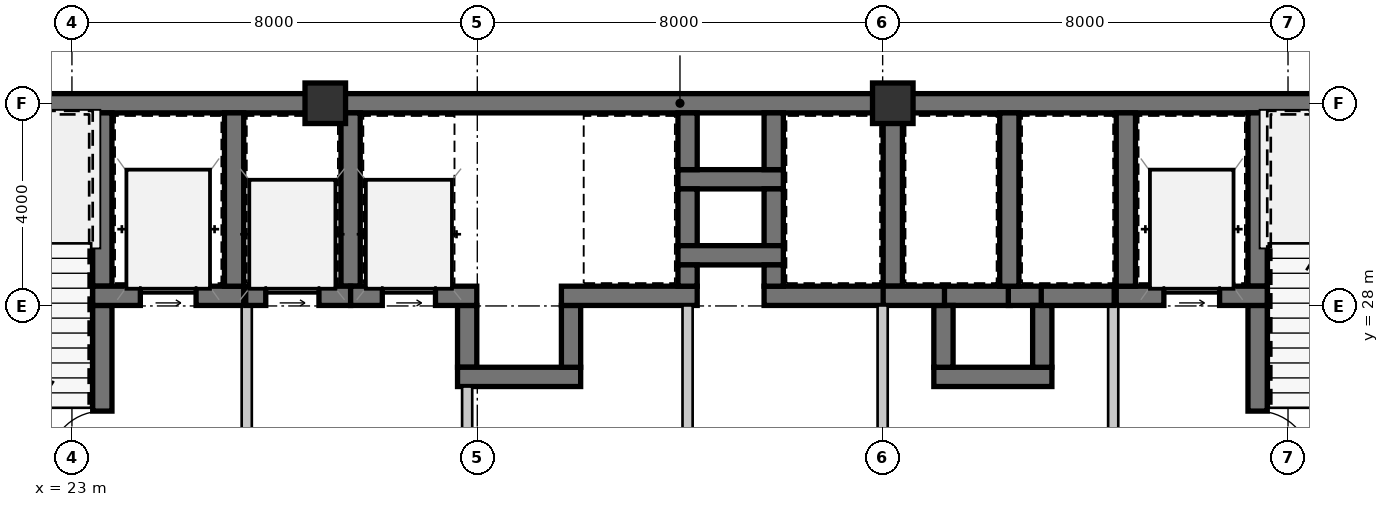
"""IFC4 building model, lengths in metres.
Left out: names, types, materials, properties, quantities, classifications, styles, units other than length and angle.
Written with IfcOpenShell. Run it as: python <this file> out.ifc"""

import sys

from ifc_helpers import new_model, si_unit, direction, frame, frame_2d, origin, origin_2d, place, context, subcontext, project, spatial, rectangle, extrude, source, transform, mapped, element, fill, save


model = new_model("IFC4")
c1 = context("Model", 3, precision=1e-05, world=origin(), true_north=direction((0.0, 1.0)))
c2 = subcontext(c1, "Body", "Model", "MODEL_VIEW")
j1 = project(units=[si_unit("LENGTHUNIT", "METRE"), si_unit("PLANEANGLEUNIT", "RADIAN")], contexts=[c1])
p1 = place(None, origin())
s1 = spatial("IfcSite", under=j1, at=p1, CompositionType="ELEMENT")
p2 = place(p1, origin())
s2 = spatial("IfcBuilding", under=s1, at=p2, CompositionType="ELEMENT")
p3 = place(p2, frame((0.0, 0.0, 19.95)))
s3 = spatial("IfcBuildingStorey", under=s2, at=p3, CompositionType="ELEMENT", Elevation=19.95)
m1 = source(origin(), c2, "Body", "SweptSolid", [
    extrude(rectangle(XDim=0.8, YDim=0.8, at=origin_2d()), origin(), (0.0, 0.0, 1.0), 3.15),
])
for number, where, z_axis, x_axis in (
    (1, (28.0, 32.0, 0.0), (0.0, 0.0, 1.0), (1.0, 0.0, 0.0)),
    (2, (39.2, 32.0, 0.0), (0.0, 0.0, 1.0), (1.0, 0.0, 0.0)),
):
    element("IfcColumn", number, at=place(p3, frame(where, z_axis=z_axis, x_axis=x_axis)), inside=s3, PredefinedType="COLUMN", context=c2, shape_type="MappedRepresentation", body=[
        mapped(m1, transform((0.0, 0.0, 0.0), scale=1.0)),
    ])
m2 = source(origin(), c2, "Body", "SweptSolid", [
    extrude(rectangle(XDim=9.19, YDim=0.38, at=frame_2d((4.595, 0.0))), origin(), (0.0, 0.0, 1.0), 2.93),
])
p4 = place(p3, frame((18.81, 32.0, 0.0), z_axis=(0.0, 0.0, 1.0), x_axis=(1.0, 0.0, 0.0)))
e3 = element("IfcWall", 3, at=p4, inside=s3, PredefinedType="SHEAR", context=c2, shape_type="MappedRepresentation", body=[
    mapped(m2, transform((0.0, 0.0, 0.0), scale=1.0)),
])
m3 = source(origin(), c2, "Body", "SweptSolid", [
    extrude(rectangle(XDim=11.2, YDim=0.38, at=frame_2d((5.6, 0.0))), origin(), (0.0, 0.0, 1.0), 2.93),
])
p5 = place(p3, frame((28.0, 32.0, 0.0), z_axis=(0.0, 0.0, 1.0), x_axis=(1.0, 0.0, 0.0)))
e4 = element("IfcWall", 4, at=p5, inside=s3, PredefinedType="SHEAR", context=c2, shape_type="MappedRepresentation", body=[
    mapped(m3, transform((0.0, 0.0, 0.0), scale=1.0)),
])
m4 = source(origin(), c2, "Body", "SweptSolid", [
    extrude(rectangle(XDim=11.99, YDim=0.38, at=frame_2d((5.995, 0.0))), origin(), (0.0, 0.0, 1.0), 2.93),
])
p6 = place(p3, frame((39.2, 32.0, 0.0), z_axis=(0.0, 0.0, 1.0), x_axis=(1.0, 0.0, 0.0)))
e5 = element("IfcWall", 5, at=p6, inside=s3, PredefinedType="SHEAR", context=c2, shape_type="MappedRepresentation", body=[
    mapped(m4, transform((0.0, 0.0, 0.0), scale=1.0)),
])
m5 = source(origin(), c2, "Body", "SweptSolid", [
    extrude(rectangle(XDim=3.42, YDim=0.38, at=frame_2d((1.71, 0.0))), origin(), (0.0, 0.0, 1.0), 2.93),
])
p7 = place(p3, frame((23.6, 28.39, 0.0), z_axis=(0.0, 0.0, 1.0), x_axis=(0.0, 1.0, 0.0)))
e6 = element("IfcWall", 6, at=p7, inside=s3, PredefinedType="SHEAR", context=c2, shape_type="MappedRepresentation", body=[
    mapped(m5, transform((0.0, 0.0, 0.0), scale=1.0)),
])
m6 = source(origin(), c2, "Body", "SweptSolid", [
    extrude(rectangle(XDim=3.82, YDim=0.38, at=frame_2d((1.91, 0.0))), origin(), (0.0, 0.0, 1.0), 2.93),
])
p8 = place(p3, frame((23.6, 24.19, 0.0), z_axis=(0.0, 0.0, 1.0), x_axis=(0.0, 1.0, 0.0)))
e7 = element("IfcWall", 7, at=p8, inside=s3, PredefinedType="SHEAR", context=c2, shape_type="MappedRepresentation", body=[
    mapped(m6, transform((0.0, 0.0, 0.0), scale=1.0)),
])
m7 = source(origin(), c2, "Body", "SweptSolid", [
    extrude(rectangle(XDim=1.05, YDim=2.1, at=frame_2d((0.525, 1.05))), frame((0.0, 0.2, 0.0), z_axis=(0.0, -1.0, 0.0), x_axis=(1.0, 0.0, 0.0)), (0.0, 0.0, 1.0), 0.4),
])
p9 = place(p8, frame((0.685, 0.0, 0.0)))
e8 = element("IfcOpeningElement", 8, at=p9, cuts=e7, PredefinedType="OPENING", context=c2, shape_type="MappedRepresentation", body=[
    mapped(m7, transform((0.0, 0.0, 0.0), scale=1.0)),
])
m8 = source(origin(), c2, "Body", "SweptSolid", [
    extrude(rectangle(XDim=2.98, YDim=0.38, at=frame_2d((1.49, 0.0))), origin(), (0.0, 0.0, 1.0), 2.93),
])
p10 = place(p3, frame((23.41, 28.2, 0.0), z_axis=(0.0, 0.0, 1.0), x_axis=(1.0, 0.0, 0.0)))
e9 = element("IfcWall", 9, at=p10, inside=s3, PredefinedType="SHEAR", context=c2, shape_type="MappedRepresentation", body=[
    mapped(m8, transform((0.0, 0.0, 0.0), scale=1.0)),
])
m9 = source(origin(), c2, "Body", "SweptSolid", [
    extrude(rectangle(XDim=1.1, YDim=2.15, at=frame_2d((0.55, 1.075))), frame((0.0, 0.2, 0.0), z_axis=(0.0, -1.0, 0.0), x_axis=(1.0, 0.0, 0.0)), (0.0, 0.0, 1.0), 0.4),
])
p11 = place(p10, frame((0.94, 0.0, 0.0)))
e10 = element("IfcOpeningElement", 10, at=p11, cuts=e9, PredefinedType="OPENING", context=c2, shape_type="MappedRepresentation", body=[
    mapped(m9, transform((0.0, 0.0, 0.0), scale=1.0)),
])
p12 = place(p3, frame((26.2, 28.39, 0.0), z_axis=(0.0, 0.0, 1.0), x_axis=(0.0, 1.0, 0.0)))
e11 = element("IfcWall", 11, at=p12, inside=s3, PredefinedType="SHEAR", context=c2, shape_type="MappedRepresentation", body=[
    mapped(m5, transform((0.0, 0.0, 0.0), scale=1.0)),
])
m10 = source(origin(), c2, "Body", "SweptSolid", [
    extrude(rectangle(XDim=3.91, YDim=0.2, at=frame_2d((1.955, 0.0))), origin(), (0.0, 0.0, 1.0), 2.93),
])
p13 = place(p3, frame((26.45, 24.1, 0.0), z_axis=(0.0, 0.0, 1.0), x_axis=(0.0, 1.0, 0.0)))
e12 = element("IfcWall", 12, at=p13, inside=s3, PredefinedType="SOLIDWALL", context=c2, shape_type="MappedRepresentation", body=[
    mapped(m10, transform((0.0, 0.0, 0.0), scale=1.0)),
])
p14 = place(p3, frame((46.4, 31.81, 0.0), z_axis=(0.0, 0.0, 1.0), x_axis=(0.0, -1.0, 0.0)))
e13 = element("IfcWall", 13, at=p14, inside=s3, PredefinedType="SHEAR", context=c2, shape_type="MappedRepresentation", body=[
    mapped(m5, transform((0.0, 0.0, 0.0), scale=1.0)),
])
p15 = place(p3, frame((46.4, 28.01, 0.0), z_axis=(0.0, 0.0, 1.0), x_axis=(0.0, -1.0, 0.0)))
e14 = element("IfcWall", 14, at=p15, inside=s3, PredefinedType="SHEAR", context=c2, shape_type="MappedRepresentation", body=[
    mapped(m6, transform((0.0, 0.0, 0.0), scale=1.0)),
])
p16 = place(p15, frame((2.085, 0.0, 0.0)))
e15 = element("IfcOpeningElement", 15, at=p16, cuts=e14, PredefinedType="OPENING", context=c2, shape_type="MappedRepresentation", body=[
    mapped(m7, transform((0.0, 0.0, 0.0), scale=1.0)),
])
p17 = place(p3, frame((43.61, 28.2, 0.0), z_axis=(0.0, 0.0, 1.0), x_axis=(1.0, 0.0, 0.0)))
e16 = element("IfcWall", 16, at=p17, inside=s3, PredefinedType="SHEAR", context=c2, shape_type="MappedRepresentation", body=[
    mapped(m8, transform((0.0, 0.0, 0.0), scale=1.0)),
])
p18 = place(p17, frame((0.94, 0.0, 0.0)))
e17 = element("IfcOpeningElement", 17, at=p18, cuts=e16, PredefinedType="OPENING", context=c2, shape_type="MappedRepresentation", body=[
    mapped(m9, transform((0.0, 0.0, 0.0), scale=1.0)),
])
p19 = place(p3, frame((43.8, 31.81, 0.0), z_axis=(0.0, 0.0, 1.0), x_axis=(0.0, -1.0, 0.0)))
e18 = element("IfcWall", 18, at=p19, inside=s3, PredefinedType="SHEAR", context=c2, shape_type="MappedRepresentation", body=[
    mapped(m5, transform((0.0, 0.0, 0.0), scale=1.0)),
])
p20 = place(p3, frame((43.55, 28.01, 0.0), z_axis=(0.0, 0.0, 1.0), x_axis=(0.0, -1.0, 0.0)))
e19 = element("IfcWall", 19, at=p20, inside=s3, PredefinedType="SOLIDWALL", context=c2, shape_type="MappedRepresentation", body=[
    mapped(m10, transform((0.0, 0.0, 0.0), scale=1.0)),
])
m11 = source(origin(), c2, "Body", "SweptSolid", [
    extrude(rectangle(XDim=2.08, YDim=0.38, at=frame_2d((1.04, 0.0))), origin(), (0.0, 0.0, 1.0), 2.93),
])
p21 = place(p3, frame((34.96, 30.5, 0.0), z_axis=(0.0, 0.0, 1.0), x_axis=(1.0, 0.0, 0.0)))
e20 = element("IfcWall", 20, at=p21, inside=s3, PredefinedType="SHEAR", context=c2, shape_type="MappedRepresentation", body=[
    mapped(m11, transform((0.0, 0.0, 0.0), scale=1.0)),
])
m12 = source(origin(), c2, "Body", "SweptSolid", [
    extrude(rectangle(XDim=1.12, YDim=0.38, at=frame_2d((0.56, 0.0))), origin(), (0.0, 0.0, 1.0), 2.93),
])
for number, where, z_axis, x_axis in (
    (21, (35.15, 31.81, 0.0), (0.0, 0.0, 1.0), (0.0, -1.0, 0.0)),
    (22, (36.85, 30.69, 0.0), (0.0, 0.0, 1.0), (0.0, 1.0, 0.0)),
    (23, (35.15, 30.31, 0.0), (0.0, 0.0, 1.0), (0.0, -1.0, 0.0)),
    (24, (36.85, 29.19, 0.0), (0.0, 0.0, 1.0), (0.0, 1.0, 0.0)),
):
    element("IfcWall", number, at=place(p3, frame(where, z_axis=z_axis, x_axis=x_axis)), inside=s3, PredefinedType="SHEAR", context=c2, shape_type="MappedRepresentation", body=[
        mapped(m12, transform((0.0, 0.0, 0.0), scale=1.0)),
    ])
p22 = place(p3, frame((34.96, 29.0, 0.0), z_axis=(0.0, 0.0, 1.0), x_axis=(1.0, 0.0, 0.0)))
e25 = element("IfcWall", 25, at=p22, inside=s3, PredefinedType="SHEAR", context=c2, shape_type="MappedRepresentation", body=[
    mapped(m11, transform((0.0, 0.0, 0.0), scale=1.0)),
])
m13 = source(origin(), c2, "Body", "SweptSolid", [
    extrude(rectangle(XDim=1.22, YDim=0.38, at=frame_2d((0.61, 0.0))), origin(), (0.0, 0.0, 1.0), 2.93),
])
p23 = place(p3, frame((30.8, 28.01, 0.0), z_axis=(0.0, 0.0, 1.0), x_axis=(0.0, -1.0, 0.0)))
e26 = element("IfcWall", 26, at=p23, inside=s3, PredefinedType="SHEAR", context=c2, shape_type="MappedRepresentation", body=[
    mapped(m13, transform((0.0, 0.0, 0.0), scale=1.0)),
])
m14 = source(origin(), c2, "Body", "SweptSolid", [
    extrude(rectangle(XDim=2.43, YDim=0.38, at=frame_2d((1.215, 0.0))), origin(), (0.0, 0.0, 1.0), 2.93),
])
p24 = place(p3, frame((30.61, 26.6, 0.0), z_axis=(0.0, 0.0, 1.0), x_axis=(1.0, 0.0, 0.0)))
e27 = element("IfcWall", 27, at=p24, inside=s3, PredefinedType="SHEAR", context=c2, shape_type="MappedRepresentation", body=[
    mapped(m14, transform((0.0, 0.0, 0.0), scale=1.0)),
])
p25 = place(p3, frame((32.85, 26.79, 0.0), z_axis=(0.0, 0.0, 1.0), x_axis=(0.0, 1.0, 0.0)))
e28 = element("IfcWall", 28, at=p25, inside=s3, PredefinedType="SHEAR", context=c2, shape_type="MappedRepresentation", body=[
    mapped(m13, transform((0.0, 0.0, 0.0), scale=1.0)),
])
m15 = source(origin(), c2, "Body", "SweptSolid", [
    extrude(rectangle(XDim=1.32, YDim=0.38, at=frame_2d((0.66, 0.0))), origin(), (0.0, 0.0, 1.0), 2.93),
])
p26 = place(p3, frame((41.52, 28.2, 0.0), z_axis=(0.0, 0.0, 1.0), x_axis=(-1.0, 0.0, 0.0)))
e29 = element("IfcWall", 29, at=p26, inside=s3, PredefinedType="SHEAR", context=c2, shape_type="MappedRepresentation", body=[
    mapped(m15, transform((0.0, 0.0, 0.0), scale=1.0)),
])
m16 = source(origin(), c2, "Body", "SweptSolid", [
    extrude(rectangle(XDim=0.67, YDim=0.38, at=frame_2d((0.335, 0.0))), origin(), (0.0, 0.0, 1.0), 2.93),
])
p27 = place(p3, frame((42.15, 28.2, 0.0), z_axis=(0.0, 0.0, 1.0), x_axis=(-1.0, 0.0, 0.0)))
e30 = element("IfcWall", 30, at=p27, inside=s3, PredefinedType="SHEAR", context=c2, shape_type="MappedRepresentation", body=[
    mapped(m16, transform((0.0, 0.0, 0.0), scale=1.0)),
])
m17 = source(origin(), c2, "Body", "SweptSolid", [
    extrude(rectangle(XDim=2.33, YDim=0.38, at=frame_2d((1.165, 0.0))), origin(), (0.0, 0.0, 1.0), 2.93),
])
p28 = place(p3, frame((40.01, 26.6, 0.0), z_axis=(0.0, 0.0, 1.0), x_axis=(1.0, 0.0, 0.0)))
e31 = element("IfcWall", 31, at=p28, inside=s3, PredefinedType="SHEAR", context=c2, shape_type="MappedRepresentation", body=[
    mapped(m17, transform((0.0, 0.0, 0.0), scale=1.0)),
])
for number, where, z_axis, x_axis in (
    (32, (40.2, 28.01, 0.0), (0.0, 0.0, 1.0), (0.0, -1.0, 0.0)),
    (33, (42.15, 26.79, 0.0), (0.0, 0.0, 1.0), (0.0, 1.0, 0.0)),
):
    element("IfcWall", number, at=place(p3, frame(where, z_axis=z_axis, x_axis=x_axis)), inside=s3, PredefinedType="SHEAR", context=c2, shape_type="MappedRepresentation", body=[
        mapped(m13, transform((0.0, 0.0, 0.0), scale=1.0)),
    ])
p29 = place(p3, frame((28.5, 28.39, 0.0), z_axis=(0.0, 0.0, 1.0), x_axis=(0.0, 1.0, 0.0)))
e34 = element("IfcWall", 34, at=p29, inside=s3, PredefinedType="SHEAR", context=c2, shape_type="MappedRepresentation", body=[
    mapped(m5, transform((0.0, 0.0, 0.0), scale=1.0)),
])
m18 = source(origin(), c2, "Body", "SweptSolid", [
    extrude(rectangle(XDim=2.07, YDim=0.38, at=frame_2d((1.035, 0.0))), origin(), (0.0, 0.0, 1.0), 2.93),
])
p30 = place(p3, frame((26.43, 28.2, 0.0), z_axis=(0.0, 0.0, 1.0), x_axis=(1.0, 0.0, 0.0)))
e35 = element("IfcWall", 35, at=p30, inside=s3, PredefinedType="SHEAR", context=c2, shape_type="MappedRepresentation", body=[
    mapped(m18, transform((0.0, 0.0, 0.0), scale=1.0)),
])
m19 = source(origin(), c2, "Body", "SweptSolid", [
    extrude(rectangle(XDim=1.05, YDim=2.15, at=frame_2d((0.525, 1.075))), frame((0.0, 0.2, 0.0), z_axis=(0.0, -1.0, 0.0), x_axis=(1.0, 0.0, 0.0)), (0.0, 0.0, 1.0), 0.4),
])
p31 = place(p30, frame((0.395, 0.0, 0.0)))
e36 = element("IfcOpeningElement", 36, at=p31, cuts=e35, PredefinedType="OPENING", context=c2, shape_type="MappedRepresentation", body=[
    mapped(m19, transform((0.0, 0.0, 0.0), scale=1.0)),
])
m20 = source(origin(), c2, "Body", "SweptSolid", [
    extrude(rectangle(XDim=2.49, YDim=0.38, at=frame_2d((1.245, 0.0))), origin(), (0.0, 0.0, 1.0), 2.93),
])
p32 = place(p3, frame((28.5, 28.2, 0.0), z_axis=(0.0, 0.0, 1.0), x_axis=(1.0, 0.0, 0.0)))
e37 = element("IfcWall", 37, at=p32, inside=s3, PredefinedType="SHEAR", context=c2, shape_type="MappedRepresentation", body=[
    mapped(m20, transform((0.0, 0.0, 0.0), scale=1.0)),
])
p33 = place(p32, frame((0.625, 0.0, 0.0)))
e38 = element("IfcOpeningElement", 38, at=p33, cuts=e37, PredefinedType="OPENING", context=c2, shape_type="MappedRepresentation", body=[
    mapped(m19, transform((0.0, 0.0, 0.0), scale=1.0)),
])
m21 = source(origin(), c2, "Body", "SweptSolid", [
    extrude(rectangle(XDim=2.31, YDim=0.2, at=frame_2d((1.155, 0.0))), origin(), (0.0, 0.0, 1.0), 2.93),
])
p34 = place(p3, frame((30.8, 26.41, 0.0), z_axis=(0.0, 0.0, 1.0), x_axis=(0.0, -1.0, 0.0)))
e39 = element("IfcWall", 39, at=p34, inside=s3, PredefinedType="SOLIDWALL", context=c2, shape_type="MappedRepresentation", body=[
    mapped(m21, transform((0.0, 0.0, 0.0), scale=1.0)),
])
m22 = source(origin(), c2, "Body", "SweptSolid", [
    extrude(rectangle(XDim=2.68, YDim=0.38, at=frame_2d((1.34, 0.0))), origin(), (0.0, 0.0, 1.0), 2.93),
])
p35 = place(p3, frame((32.66, 28.2, 0.0), z_axis=(0.0, 0.0, 1.0), x_axis=(1.0, 0.0, 0.0)))
e40 = element("IfcWall", 40, at=p35, inside=s3, PredefinedType="SHEAR", context=c2, shape_type="MappedRepresentation", body=[
    mapped(m22, transform((0.0, 0.0, 0.0), scale=1.0)),
])
m23 = source(origin(), c2, "Body", "SweptSolid", [
    extrude(rectangle(XDim=0.42, YDim=0.38, at=frame_2d((0.21, 0.0))), origin(), (0.0, 0.0, 1.0), 2.93),
])
p36 = place(p3, frame((35.15, 28.39, 0.0), z_axis=(0.0, 0.0, 1.0), x_axis=(0.0, 1.0, 0.0)))
e41 = element("IfcWall", 41, at=p36, inside=s3, PredefinedType="SHEAR", context=c2, shape_type="MappedRepresentation", body=[
    mapped(m23, transform((0.0, 0.0, 0.0), scale=1.0)),
])
p37 = place(p3, frame((39.2, 28.39, 0.0), z_axis=(0.0, 0.0, 1.0), x_axis=(0.0, 1.0, 0.0)))
e42 = element("IfcWall", 42, at=p37, inside=s3, PredefinedType="SHEAR", context=c2, shape_type="MappedRepresentation", body=[
    mapped(m5, transform((0.0, 0.0, 0.0), scale=1.0)),
])
m24 = source(origin(), c2, "Body", "SweptSolid", [
    extrude(rectangle(XDim=2.36, YDim=0.38, at=frame_2d((1.18, 0.0))), origin(), (0.0, 0.0, 1.0), 2.93),
])
p38 = place(p3, frame((36.66, 28.2, 0.0), z_axis=(0.0, 0.0, 1.0), x_axis=(1.0, 0.0, 0.0)))
e43 = element("IfcWall", 43, at=p38, inside=s3, PredefinedType="SHEAR", context=c2, shape_type="MappedRepresentation", body=[
    mapped(m24, transform((0.0, 0.0, 0.0), scale=1.0)),
])
p39 = place(p3, frame((36.85, 28.81, 0.0), z_axis=(0.0, 0.0, 1.0), x_axis=(0.0, -1.0, 0.0)))
e44 = element("IfcWall", 44, at=p39, inside=s3, PredefinedType="SHEAR", context=c2, shape_type="MappedRepresentation", body=[
    mapped(m23, transform((0.0, 0.0, 0.0), scale=1.0)),
])
p40 = place(p3, frame((41.5, 28.39, 0.0), z_axis=(0.0, 0.0, 1.0), x_axis=(0.0, 1.0, 0.0)))
e45 = element("IfcWall", 45, at=p40, inside=s3, PredefinedType="SHEAR", context=c2, shape_type="MappedRepresentation", body=[
    mapped(m5, transform((0.0, 0.0, 0.0), scale=1.0)),
])
m25 = source(origin(), c2, "Body", "SweptSolid", [
    extrude(rectangle(XDim=1.21, YDim=0.38, at=frame_2d((0.605, 0.0))), origin(), (0.0, 0.0, 1.0), 2.93),
])
p41 = place(p3, frame((39.01, 28.2, 0.0), z_axis=(0.0, 0.0, 1.0), x_axis=(1.0, 0.0, 0.0)))
e46 = element("IfcWall", 46, at=p41, inside=s3, PredefinedType="SHEAR", context=c2, shape_type="MappedRepresentation", body=[
    mapped(m25, transform((0.0, 0.0, 0.0), scale=1.0)),
])
m26 = source(origin(), c2, "Body", "SweptSolid", [
    extrude(rectangle(XDim=1.44, YDim=0.38, at=frame_2d((0.72, 0.0))), origin(), (0.0, 0.0, 1.0), 2.93),
])
p42 = place(p3, frame((42.13, 28.2, 0.0), z_axis=(0.0, 0.0, 1.0), x_axis=(1.0, 0.0, 0.0)))
e47 = element("IfcWall", 47, at=p42, inside=s3, PredefinedType="SHEAR", context=c2, shape_type="MappedRepresentation", body=[
    mapped(m26, transform((0.0, 0.0, 0.0), scale=1.0)),
])
for number, where, z_axis, x_axis in (
    (48, (35.15, 28.01, 0.0), (0.0, 0.0, 1.0), (0.0, -1.0, 0.0)),
    (49, (39.0, 28.01, 0.0), (0.0, 0.0, 1.0), (0.0, -1.0, 0.0)),
):
    element("IfcWall", number, at=place(p3, frame(where, z_axis=z_axis, x_axis=x_axis)), inside=s3, PredefinedType="SOLIDWALL", context=c2, shape_type="MappedRepresentation", body=[
        mapped(m10, transform((0.0, 0.0, 0.0), scale=1.0)),
    ])
m27 = source(origin(), c2, "Body", "SweptSolid", [
    extrude(rectangle(XDim=1.05, YDim=2.1, at=frame_2d((0.525, 1.05))), frame((0.0, 0.025, 0.0), z_axis=(0.0, -1.0, 0.0), x_axis=(1.0, 0.0, 0.0)), (0.0, 0.0, 1.0), 0.05),
])
p43 = place(p9, origin())
e50 = element("IfcDoor", 50, at=p43, inside=s3, OperationType="SINGLE_SWING_LEFT", PredefinedType="DOOR", context=c2, shape_type="MappedRepresentation", body=[
    mapped(m27, transform((0.0, 0.0, 0.0), scale=1.0)),
])
fill(e8, e50)
m28 = source(origin(), c2, "Body", "SweptSolid", [
    extrude(rectangle(XDim=1.1, YDim=2.15, at=frame_2d((0.55, 1.075))), frame((0.0, 0.025, 0.0), z_axis=(0.0, -1.0, 0.0), x_axis=(1.0, 0.0, 0.0)), (0.0, 0.0, 1.0), 0.05),
])
p44 = place(p11, origin())
e51 = element("IfcDoor", 51, at=p44, inside=s3, OperationType="SLIDING_TO_LEFT", PredefinedType="DOOR", context=c2, shape_type="MappedRepresentation", body=[
    mapped(m28, transform((0.0, 0.0, 0.0), scale=1.0)),
])
fill(e10, e51)
p45 = place(p16, origin())
e52 = element("IfcDoor", 52, at=p45, inside=s3, OperationType="SINGLE_SWING_RIGHT", PredefinedType="DOOR", context=c2, shape_type="MappedRepresentation", body=[
    mapped(m27, transform((0.0, 0.0, 0.0), scale=1.0)),
])
fill(e15, e52)
p46 = place(p18, origin())
e53 = element("IfcDoor", 53, at=p46, inside=s3, OperationType="SLIDING_TO_LEFT", PredefinedType="DOOR", context=c2, shape_type="MappedRepresentation", body=[
    mapped(m28, transform((0.0, 0.0, 0.0), scale=1.0)),
])
fill(e17, e53)
m29 = source(origin(), c2, "Body", "SweptSolid", [
    extrude(rectangle(XDim=1.05, YDim=2.15, at=frame_2d((0.525, 1.075))), frame((0.0, 0.025, 0.0), z_axis=(0.0, -1.0, 0.0), x_axis=(1.0, 0.0, 0.0)), (0.0, 0.0, 1.0), 0.05),
])
p47 = place(p31, origin())
e54 = element("IfcDoor", 54, at=p47, inside=s3, OperationType="SLIDING_TO_LEFT", PredefinedType="DOOR", context=c2, shape_type="MappedRepresentation", body=[
    mapped(m29, transform((0.0, 0.0, 0.0), scale=1.0)),
])
fill(e36, e54)
p48 = place(p33, origin())
e55 = element("IfcDoor", 55, at=p48, inside=s3, OperationType="SLIDING_TO_LEFT", PredefinedType="DOOR", context=c2, shape_type="MappedRepresentation", body=[
    mapped(m29, transform((0.0, 0.0, 0.0), scale=1.0)),
])
fill(e38, e55)
save(model, sys.argv[1])
